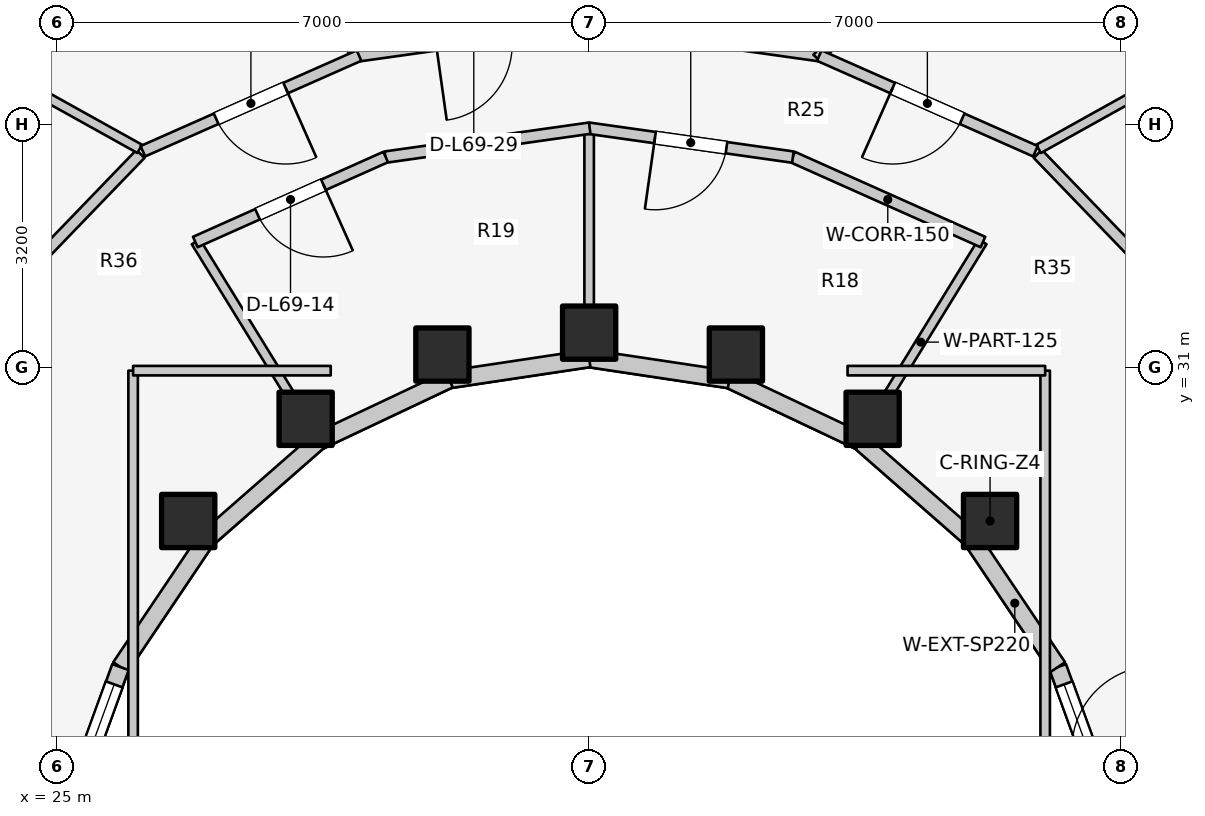
"""IFC4 building model, lengths in metres.
Left out: names, types, materials, properties, quantities, classifications, styles, units other than length and angle.
Written with IfcOpenShell. Run it as: python <this file> out.ifc"""

import sys

from ifc_helpers import new_model, si_unit, direction, frame, frame_2d, origin, origin_2d, place, context, subcontext, project, spatial, rectangle, extrude, element, fill, save


model = new_model("IFC4")
c1 = context("Model", 3, precision=1e-05, world=origin(), true_north=direction((0.0, 1.0)))
c2 = subcontext(c1, "Body", "Model", "MODEL_VIEW")
j1 = project(units=[si_unit("LENGTHUNIT", "METRE"), si_unit("PLANEANGLEUNIT", "RADIAN")], contexts=[c1])
p1 = place(None, origin())
s1 = spatial("IfcSite", under=j1, at=p1, CompositionType="ELEMENT")
p2 = place(p1, origin())
s2 = spatial("IfcBuilding", under=s1, at=p2, CompositionType="ELEMENT")
p3 = place(p2, frame((0.0, 0.0, 226.4)))
s3 = spatial("IfcBuildingStorey", under=s2, at=p3, CompositionType="ELEMENT", Elevation=226.4)
for number, where, z_axis, x_axis in (
    (1, (37.275, 28.982, 0.0), (0.0, 0.0, 1.0), (1.0, 0.0, 0.0)),
    (2, (35.73, 30.327, 0.0), (0.0, 0.0, 1.0), (1.0, 0.0, 0.0)),
    (3, (33.931, 31.172, 0.0), (0.0, 0.0, 1.0), (1.0, 0.0, 0.0)),
    (4, (32.0, 31.46, 0.0), (0.0, 0.0, 1.0), (1.0, 0.0, 0.0)),
    (5, (30.069, 31.172, 0.0), (0.0, 0.0, 1.0), (1.0, 0.0, 0.0)),
    (6, (28.27, 30.327, 0.0), (0.0, 0.0, 1.0), (1.0, 0.0, 0.0)),
    (7, (26.725, 28.982, 0.0), (0.0, 0.0, 1.0), (1.0, 0.0, 0.0)),
):
    element("IfcColumn", number, at=place(p3, frame(where, z_axis=z_axis, x_axis=x_axis)), inside=s3, PredefinedType="COLUMN", context=c2, shape_type="SweptSolid", body=[
        extrude(rectangle(XDim=0.7, YDim=0.7, at=origin_2d()), origin(), (0.0, 0.0, 1.0), 3.1),
    ])
p4 = place(p3, frame((38.877, 25.102, 0.0), z_axis=(0.0, 0.0, 1.0), x_axis=(-0.341423187295, 0.93990968033, 0.0)))
e8 = element("IfcWall", 8, at=p4, inside=s3, PredefinedType="STANDARD", context=c2, shape_type="SweptSolid", body=[
    extrude(rectangle(XDim=2.084, YDim=0.23, at=frame_2d((1.042, 0.0))), origin(), (0.0, 0.0, 1.0), 2.84),
])
p5 = place(p4, frame((0.242, 0.0, 0.85)))
e9 = element("IfcOpeningElement", 9, at=p5, cuts=e8, PredefinedType="OPENING", context=c2, shape_type="SweptSolid", body=[
    extrude(rectangle(XDim=1.6, YDim=1.65, at=frame_2d((0.8, 0.825))), frame((0.0, 0.125, 0.0), z_axis=(0.0, -1.0, 0.0), x_axis=(1.0, 0.0, 0.0)), (0.0, 0.0, 1.0), 0.25),
])
p6 = place(p3, frame((38.166, 27.06, 0.0), z_axis=(0.0, 0.0, 1.0), x_axis=(-0.558197800898, 0.829707909492, 0.0)))
e10 = element("IfcWall", 10, at=p6, inside=s3, PredefinedType="STANDARD", context=c2, shape_type="SweptSolid", body=[
    extrude(rectangle(XDim=2.027, YDim=0.23, at=frame_2d((1.013, 0.0))), origin(), (0.0, 0.0, 1.0), 2.16),
])
p7 = place(p3, frame((37.035, 28.742, 0.0), z_axis=(0.0, 0.0, 1.0), x_axis=(-0.752576694707, 0.658504607869, 0.0)))
e11 = element("IfcWall", 11, at=p7, inside=s3, PredefinedType="STANDARD", context=c2, shape_type="SweptSolid", body=[
    extrude(rectangle(XDim=1.959, YDim=0.23, at=frame_2d((0.98, 0.0))), origin(), (0.0, 0.0, 1.0), 2.16),
])
p8 = place(p3, frame((35.56, 30.032, 0.0), z_axis=(0.0, 0.0, 1.0), x_axis=(-0.904179699603, 0.427152280606, 0.0)))
e12 = element("IfcWall", 12, at=p8, inside=s3, PredefinedType="STANDARD", context=c2, shape_type="SweptSolid", body=[
    extrude(rectangle(XDim=1.899, YDim=0.23, at=frame_2d((0.95, 0.0))), origin(), (0.0, 0.0, 1.0), 2.16),
])
for number, where, z_axis, x_axis in (
    (13, (33.843, 30.843, 0.0), (0.0, 0.0, 1.0), (-0.989, 0.149, 0.0)),
    (14, (32.0, 31.12, 0.0), (0.0, 0.0, 1.0), (-0.989, -0.149, 0.0)),
):
    element("IfcWall", number, at=place(p3, frame(where, z_axis=z_axis, x_axis=x_axis)), inside=s3, PredefinedType="STANDARD", context=c2, shape_type="SweptSolid", body=[
        extrude(rectangle(XDim=1.864, YDim=0.23, at=frame_2d((0.932, 0.0))), origin(), (0.0, 0.0, 1.0), 2.16),
    ])
p9 = place(p3, frame((30.157, 30.843, 0.0), z_axis=(0.0, 0.0, 1.0), x_axis=(-0.904179699603, -0.427152280606, 0.0)))
e15 = element("IfcWall", 15, at=p9, inside=s3, PredefinedType="STANDARD", context=c2, shape_type="SweptSolid", body=[
    extrude(rectangle(XDim=1.899, YDim=0.23, at=frame_2d((0.95, 0.0))), origin(), (0.0, 0.0, 1.0), 2.16),
])
p10 = place(p3, frame((28.44, 30.032, 0.0), z_axis=(0.0, 0.0, 1.0), x_axis=(-0.752576694707, -0.658504607869, 0.0)))
e16 = element("IfcWall", 16, at=p10, inside=s3, PredefinedType="STANDARD", context=c2, shape_type="SweptSolid", body=[
    extrude(rectangle(XDim=1.959, YDim=0.23, at=frame_2d((0.98, 0.0))), origin(), (0.0, 0.0, 1.0), 2.16),
])
p11 = place(p3, frame((26.965, 28.742, 0.0), z_axis=(0.0, 0.0, 1.0), x_axis=(-0.558197800898, -0.829707909492, 0.0)))
e17 = element("IfcWall", 17, at=p11, inside=s3, PredefinedType="STANDARD", context=c2, shape_type="SweptSolid", body=[
    extrude(rectangle(XDim=2.027, YDim=0.23, at=frame_2d((1.013, 0.0))), origin(), (0.0, 0.0, 1.0), 2.16),
])
p12 = place(p3, frame((25.834, 27.06, 0.0), z_axis=(0.0, 0.0, 1.0), x_axis=(-0.341423187295, -0.93990968033, 0.0)))
e18 = element("IfcWall", 18, at=p12, inside=s3, PredefinedType="STANDARD", context=c2, shape_type="SweptSolid", body=[
    extrude(rectangle(XDim=2.084, YDim=0.23, at=frame_2d((1.042, 0.0))), origin(), (0.0, 0.0, 1.0), 2.84),
])
p13 = place(p12, frame((0.242, 0.0, 0.85)))
e19 = element("IfcOpeningElement", 19, at=p13, cuts=e18, PredefinedType="OPENING", context=c2, shape_type="SweptSolid", body=[
    extrude(rectangle(XDim=1.6, YDim=1.65, at=frame_2d((0.8, 0.825))), frame((0.0, 0.125, 0.0), z_axis=(0.0, -1.0, 0.0), x_axis=(1.0, 0.0, 0.0)), (0.0, 0.0, 1.0), 0.25),
])
p14 = place(p3, frame((35.55, 30.015, 0.0), z_axis=(0.0, 0.0, 1.0), x_axis=(0.523992004803, 0.851723182086, 0.0)))
e20 = element("IfcWall", 20, at=p14, inside=s3, PredefinedType="PARTITIONING", context=c2, shape_type="SweptSolid", body=[
    extrude(rectangle(XDim=3.101, YDim=0.125, at=frame_2d((1.551, 0.0))), origin(), (0.0, 0.0, 1.0), 2.376),
])
p15 = place(p3, frame((32.0, 31.1, 0.0), z_axis=(0.0, 0.0, 1.0), x_axis=(0.0, 1.0, 0.0)))
e21 = element("IfcWall", 21, at=p15, inside=s3, PredefinedType="PARTITIONING", context=c2, shape_type="SweptSolid", body=[
    extrude(rectangle(XDim=3.05, YDim=0.125, at=frame_2d((1.525, 0.0))), origin(), (0.0, 0.0, 1.0), 2.376),
])
p16 = place(p3, frame((28.45, 30.015, 0.0), z_axis=(0.0, 0.0, 1.0), x_axis=(-0.523992004803, 0.851723182086, 0.0)))
e22 = element("IfcWall", 22, at=p16, inside=s3, PredefinedType="PARTITIONING", context=c2, shape_type="SweptSolid", body=[
    extrude(rectangle(XDim=3.101, YDim=0.125, at=frame_2d((1.551, 0.0))), origin(), (0.0, 0.0, 1.0), 2.376),
])
p17 = place(p3, frame((37.181, 32.652, 0.0), z_axis=(0.0, 0.0, 1.0), x_axis=(-0.913120130558, 0.407690602257, 0.0)))
e23 = element("IfcWall", 23, at=p17, inside=s3, PredefinedType="PARTITIONING", context=c2, shape_type="SweptSolid", body=[
    extrude(rectangle(XDim=2.743, YDim=0.15, at=frame_2d((1.371, 0.0))), origin(), (0.0, 0.0, 1.0), 2.376),
])
p18 = place(p3, frame((34.68, 33.77, 0.0), z_axis=(0.0, 0.0, 1.0), x_axis=(-0.990132151456, 0.140136799779, 0.0)))
e24 = element("IfcWall", 24, at=p18, inside=s3, PredefinedType="PARTITIONING", context=c2, shape_type="SweptSolid", body=[
    extrude(rectangle(XDim=2.714, YDim=0.15, at=frame_2d((1.357, 0.0))), origin(), (0.0, 0.0, 1.0), 2.376),
])
p19 = place(p18, frame((0.882, 0.0, 0.0)))
e25 = element("IfcOpeningElement", 25, at=p19, cuts=e24, PredefinedType="OPENING", context=c2, shape_type="SweptSolid", body=[
    extrude(rectangle(XDim=0.95, YDim=2.1, at=frame_2d((0.475, 1.05))), frame((0.0, 0.085, 0.0), z_axis=(0.0, -1.0, 0.0), x_axis=(1.0, 0.0, 0.0)), (0.0, 0.0, 1.0), 0.17),
])
p20 = place(p3, frame((32.007, 34.15, 0.0), z_axis=(0.0, 0.0, 1.0), x_axis=(-0.990132151456, -0.140136799779, 0.0)))
e26 = element("IfcWall", 26, at=p20, inside=s3, PredefinedType="PARTITIONING", context=c2, shape_type="SweptSolid", body=[
    extrude(rectangle(XDim=2.714, YDim=0.15, at=frame_2d((1.357, 0.0))), origin(), (0.0, 0.0, 1.0), 2.376),
])
p21 = place(p3, frame((29.323, 33.771, 0.0), z_axis=(0.0, 0.0, 1.0), x_axis=(-0.913120130558, -0.407690602257, 0.0)))
e27 = element("IfcWall", 27, at=p21, inside=s3, PredefinedType="PARTITIONING", context=c2, shape_type="SweptSolid", body=[
    extrude(rectangle(XDim=2.743, YDim=0.15, at=frame_2d((1.371, 0.0))), origin(), (0.0, 0.0, 1.0), 2.376),
])
p22 = place(p21, frame((0.896, 0.0, 0.0)))
e28 = element("IfcOpeningElement", 28, at=p22, cuts=e27, PredefinedType="OPENING", context=c2, shape_type="SweptSolid", body=[
    extrude(rectangle(XDim=0.95, YDim=2.1, at=frame_2d((0.475, 1.05))), frame((0.0, 0.085, 0.0), z_axis=(0.0, -1.0, 0.0), x_axis=(1.0, 0.0, 0.0)), (0.0, 0.0, 1.0), 0.17),
])
p23 = place(p3, frame((26.0, 25.8, 0.0), z_axis=(0.0, 0.0, 1.0), x_axis=(0.0, 1.0, 0.0)))
e29 = element("IfcWall", 29, at=p23, inside=s3, PredefinedType="PARTITIONING", context=c2, shape_type="SweptSolid", body=[
    extrude(rectangle(XDim=5.16, YDim=0.125, at=frame_2d((2.58, 0.0))), origin(), (0.0, 0.0, 1.0), 2.232),
])
p24 = place(p3, frame((26.0, 30.96, 0.0), z_axis=(0.0, 0.0, 1.0), x_axis=(1.0, 0.0, 0.0)))
e30 = element("IfcWall", 30, at=p24, inside=s3, PredefinedType="PARTITIONING", context=c2, shape_type="SweptSolid", body=[
    extrude(rectangle(XDim=2.6, YDim=0.125, at=frame_2d((1.3, 0.0))), origin(), (0.0, 0.0, 1.0), 2.376),
])
p25 = place(p3, frame((38.0, 25.8, 0.0), z_axis=(0.0, 0.0, 1.0), x_axis=(0.0, 1.0, 0.0)))
e31 = element("IfcWall", 31, at=p25, inside=s3, PredefinedType="PARTITIONING", context=c2, shape_type="SweptSolid", body=[
    extrude(rectangle(XDim=5.16, YDim=0.125, at=frame_2d((2.58, 0.0))), origin(), (0.0, 0.0, 1.0), 2.232),
])
p26 = place(p3, frame((35.4, 30.96, 0.0), z_axis=(0.0, 0.0, 1.0), x_axis=(1.0, 0.0, 0.0)))
e32 = element("IfcWall", 32, at=p26, inside=s3, PredefinedType="PARTITIONING", context=c2, shape_type="SweptSolid", body=[
    extrude(rectangle(XDim=2.6, YDim=0.125, at=frame_2d((1.3, 0.0))), origin(), (0.0, 0.0, 1.0), 2.376),
])
for number, where, z_axis, x_axis in (
    (33, (37.903, 33.812, 0.0), (0.0, 0.0, 1.0), (0.694, -0.72, 0.0)),
    (34, (26.097, 33.812, 0.0), (0.0, 0.0, 1.0), (-0.694, -0.72, 0.0)),
):
    element("IfcWall", number, at=place(p3, frame(where, z_axis=z_axis, x_axis=x_axis)), inside=s3, PredefinedType="PARTITIONING", context=c2, shape_type="SweptSolid", body=[
        extrude(rectangle(XDim=2.158, YDim=0.15, at=frame_2d((1.079, 0.0))), origin(), (0.0, 0.0, 1.0), 2.376),
    ])
p27 = place(p3, frame((37.913, 33.878, 0.0), z_axis=(0.0, 0.0, 1.0), x_axis=(0.87377679808, 0.486327160599, 0.0)))
e35 = element("IfcWall", 35, at=p27, inside=s3, PredefinedType="PARTITIONING", context=c2, shape_type="SweptSolid", body=[
    extrude(rectangle(XDim=6.24, YDim=0.125, at=frame_2d((3.12, 0.0))), origin(), (0.0, 0.0, 1.0), 2.376),
])
p28 = place(p3, frame((28.926, 35.143, 0.0), z_axis=(0.0, 0.0, 1.0), x_axis=(-0.691128003726, 0.722732372642, 0.0)))
e36 = element("IfcWall", 36, at=p28, inside=s3, PredefinedType="PARTITIONING", context=c2, shape_type="SweptSolid", body=[
    extrude(rectangle(XDim=5.33, YDim=0.125, at=frame_2d((2.665, 0.0))), origin(), (0.0, 0.0, 1.0), 2.376),
])
p29 = place(p3, frame((26.087, 33.878, 0.0), z_axis=(0.0, 0.0, 1.0), x_axis=(-0.87377679808, 0.486327160599, 0.0)))
e37 = element("IfcWall", 37, at=p29, inside=s3, PredefinedType="PARTITIONING", context=c2, shape_type="SweptSolid", body=[
    extrude(rectangle(XDim=6.24, YDim=0.125, at=frame_2d((3.12, 0.0))), origin(), (0.0, 0.0, 1.0), 2.376),
])
p30 = place(p3, frame((35.085, 35.096, 0.0), z_axis=(0.0, 0.0, 1.0), x_axis=(-0.990254086283, 0.139272555084, 0.0)))
e38 = element("IfcWall", 38, at=p30, inside=s3, PredefinedType="PARTITIONING", context=c2, shape_type="SweptSolid", body=[
    extrude(rectangle(XDim=3.166, YDim=0.15, at=frame_2d((1.583, 0.0))), origin(), (0.0, 0.0, 1.0), 2.376),
])
p31 = place(p3, frame((35.001, 35.067, 0.0), z_axis=(0.0, 0.0, 1.0), x_axis=(0.691180416361, 0.722682248321, 0.0)))
e39 = element("IfcWall", 39, at=p31, inside=s3, PredefinedType="PLUMBINGWALL", context=c2, shape_type="SweptSolid", body=[
    extrude(rectangle(XDim=2.1, YDim=0.14, at=frame_2d((1.05, 0.0))), origin(), (0.0, 0.0, 1.0), 2.385),
])
p32 = place(p3, frame((37.872, 33.847, 0.0), z_axis=(0.0, 0.0, 1.0), x_axis=(-0.914490094652, 0.40460828808, 0.0)))
e40 = element("IfcWall", 40, at=p32, inside=s3, PredefinedType="PARTITIONING", context=c2, shape_type="SweptSolid", body=[
    extrude(rectangle(XDim=3.11, YDim=0.15, at=frame_2d((1.555, 0.0))), origin(), (0.0, 0.0, 1.0), 2.376),
])
p33 = place(p32, frame((1.055, 0.0, 0.0)))
e41 = element("IfcOpeningElement", 41, at=p33, cuts=e40, PredefinedType="OPENING", context=c2, shape_type="SweptSolid", body=[
    extrude(rectangle(XDim=1.0, YDim=2.1, at=frame_2d((0.5, 1.05))), frame((0.0, 0.085, 0.0), z_axis=(0.0, -1.0, 0.0), x_axis=(1.0, 0.0, 0.0)), (0.0, 0.0, 1.0), 0.17),
])
p34 = place(p3, frame((32.008, 35.53, 0.0), z_axis=(0.0, 0.0, 1.0), x_axis=(-0.990257602807, -0.139247549651, 0.0)))
e42 = element("IfcWall", 42, at=p34, inside=s3, PredefinedType="PARTITIONING", context=c2, shape_type="SweptSolid", body=[
    extrude(rectangle(XDim=3.082, YDim=0.15, at=frame_2d((1.541, 0.0))), origin(), (0.0, 0.0, 1.0), 2.376),
])
p35 = place(p34, frame((1.041, 0.0, 0.0)))
e43 = element("IfcOpeningElement", 43, at=p35, cuts=e42, PredefinedType="OPENING", context=c2, shape_type="SweptSolid", body=[
    extrude(rectangle(XDim=1.0, YDim=2.1, at=frame_2d((0.5, 1.05))), frame((0.0, 0.085, 0.0), z_axis=(0.0, -1.0, 0.0), x_axis=(1.0, 0.0, 0.0)), (0.0, 0.0, 1.0), 0.17),
])
p36 = place(p3, frame((28.972, 35.105, 0.0), z_axis=(0.0, 0.0, 1.0), x_axis=(-0.914490094652, -0.40460828808, 0.0)))
e44 = element("IfcWall", 44, at=p36, inside=s3, PredefinedType="PARTITIONING", context=c2, shape_type="SweptSolid", body=[
    extrude(rectangle(XDim=3.11, YDim=0.15, at=frame_2d((1.555, 0.0))), origin(), (0.0, 0.0, 1.0), 2.376),
])
p37 = place(p36, frame((1.055, 0.0, 0.0)))
e45 = element("IfcOpeningElement", 45, at=p37, cuts=e44, PredefinedType="OPENING", context=c2, shape_type="SweptSolid", body=[
    extrude(rectangle(XDim=1.0, YDim=2.1, at=frame_2d((0.5, 1.05))), frame((0.0, 0.085, 0.0), z_axis=(0.0, -1.0, 0.0), x_axis=(1.0, 0.0, 0.0)), (0.0, 0.0, 1.0), 0.17),
])
p38 = place(p5, origin())
e46 = element("IfcWindow", 46, at=p38, inside=s3, PartitioningType="SINGLE_PANEL", PredefinedType="WINDOW", context=c2, shape_type="SweptSolid", body=[
    extrude(rectangle(XDim=1.6, YDim=1.65, at=frame_2d((0.8, 0.825))), frame((0.0, 0.03, 0.0), z_axis=(0.0, -1.0, 0.0), x_axis=(1.0, 0.0, 0.0)), (0.0, 0.0, 1.0), 0.06),
])
fill(e9, e46)
p39 = place(p13, origin())
e47 = element("IfcWindow", 47, at=p39, inside=s3, PartitioningType="SINGLE_PANEL", PredefinedType="WINDOW", context=c2, shape_type="SweptSolid", body=[
    extrude(rectangle(XDim=1.6, YDim=1.65, at=frame_2d((0.8, 0.825))), frame((0.0, 0.03, 0.0), z_axis=(0.0, -1.0, 0.0), x_axis=(1.0, 0.0, 0.0)), (0.0, 0.0, 1.0), 0.06),
])
fill(e19, e47)
p40 = place(p19, origin())
e48 = element("IfcDoor", 48, at=p40, inside=s3, OperationType="SINGLE_SWING_RIGHT", PredefinedType="DOOR", context=c2, shape_type="SweptSolid", body=[
    extrude(rectangle(XDim=0.95, YDim=2.1, at=frame_2d((0.475, 1.05))), frame((0.0, 0.025, 0.0), z_axis=(0.0, -1.0, 0.0), x_axis=(1.0, 0.0, 0.0)), (0.0, 0.0, 1.0), 0.05),
])
fill(e25, e48)
p41 = place(p22, origin())
e49 = element("IfcDoor", 49, at=p41, inside=s3, OperationType="SINGLE_SWING_LEFT", PredefinedType="DOOR", context=c2, shape_type="SweptSolid", body=[
    extrude(rectangle(XDim=0.95, YDim=2.1, at=frame_2d((0.475, 1.05))), frame((0.0, 0.025, 0.0), z_axis=(0.0, -1.0, 0.0), x_axis=(1.0, 0.0, 0.0)), (0.0, 0.0, 1.0), 0.05),
])
fill(e28, e49)
p42 = place(p33, origin())
e50 = element("IfcDoor", 50, at=p42, inside=s3, OperationType="SINGLE_SWING_RIGHT", PredefinedType="DOOR", context=c2, shape_type="SweptSolid", body=[
    extrude(rectangle(XDim=1.0, YDim=2.1, at=frame_2d((0.5, 1.05))), frame((0.0, 0.025, 0.0), z_axis=(0.0, -1.0, 0.0), x_axis=(1.0, 0.0, 0.0)), (0.0, 0.0, 1.0), 0.05),
])
fill(e41, e50)
p43 = place(p37, origin())
e51 = element("IfcDoor", 51, at=p43, inside=s3, OperationType="SINGLE_SWING_LEFT", PredefinedType="DOOR", context=c2, shape_type="SweptSolid", body=[
    extrude(rectangle(XDim=1.0, YDim=2.1, at=frame_2d((0.5, 1.05))), frame((0.0, 0.025, 0.0), z_axis=(0.0, -1.0, 0.0), x_axis=(1.0, 0.0, 0.0)), (0.0, 0.0, 1.0), 0.05),
])
fill(e45, e51)
save(model, sys.argv[1])
